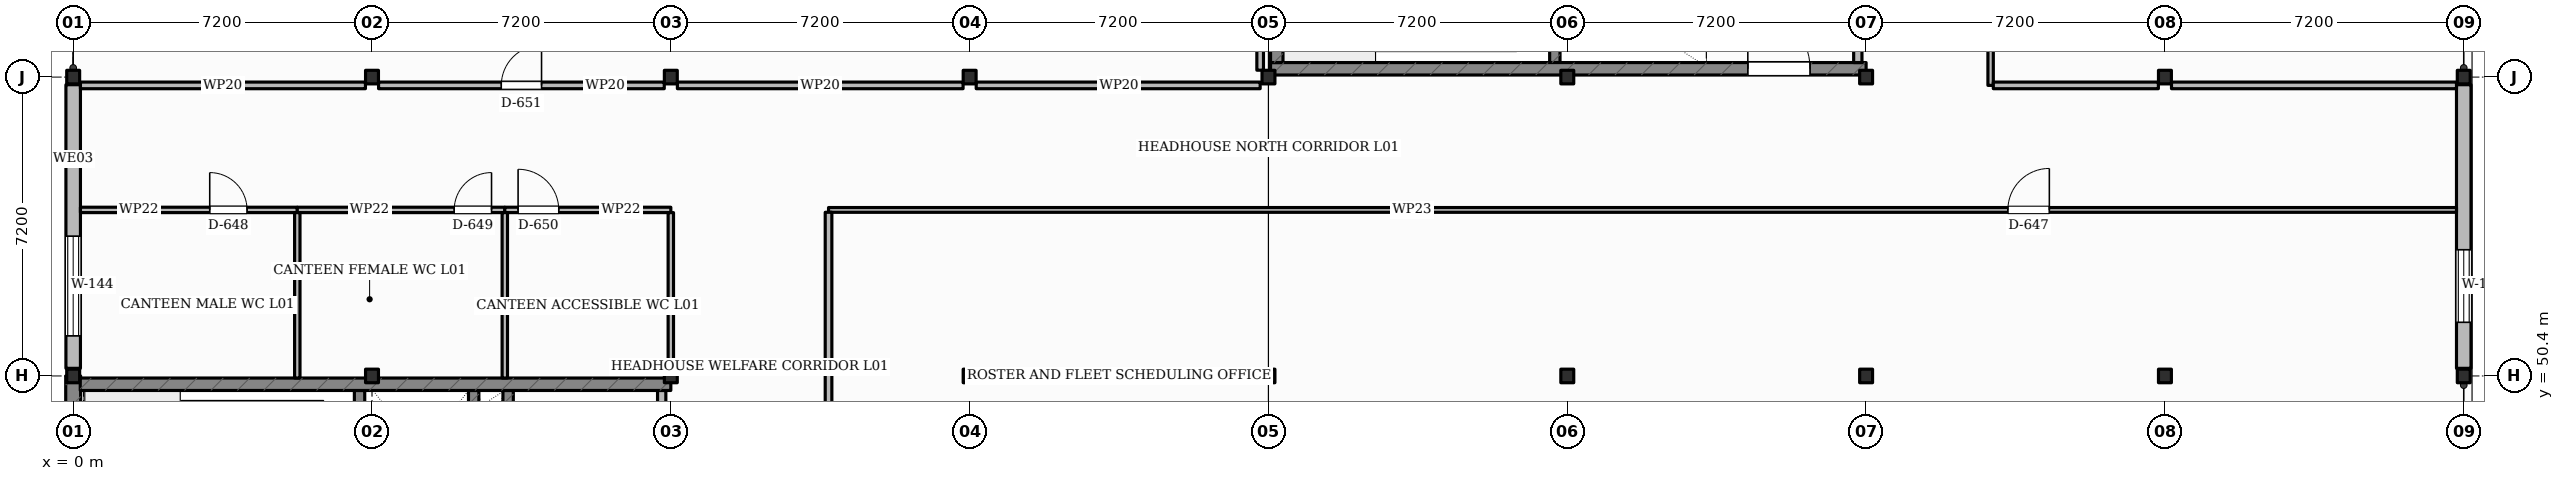
"""IFC4 building model, lengths in metres.
Left out: names, types, materials, properties, quantities, classifications, styles, units other than length and angle.
Written with IfcOpenShell. Run it as: python <this file> out.ifc"""

import sys

from ifc_helpers import new_model, si_unit, direction, frame, frame_2d, origin, origin_2d, place, context, subcontext, project, spatial, rectangle, i_section, extrude, element, fill, save


model = new_model("IFC4")
c1 = context("Model", 3, precision=1e-05, world=origin(), true_north=direction((0.0, 1.0)))
c2 = subcontext(c1, "Body", "Model", "MODEL_VIEW")
j1 = project(units=[si_unit("LENGTHUNIT", "METRE"), si_unit("PLANEANGLEUNIT", "RADIAN")], contexts=[c1])
p1 = place(None, origin())
s1 = spatial("IfcSite", under=j1, at=p1, CompositionType="ELEMENT")
p2 = place(p1, origin())
s2 = spatial("IfcBuilding", under=s1, at=p2, CompositionType="ELEMENT")
p3 = place(p2, frame((0.0, 0.0, 5.4)))
s3 = spatial("IfcBuildingStorey", under=s2, at=p3, CompositionType="ELEMENT", Elevation=5.4)
for number, where, z_axis, x_axis in (
    (1, (0.0, 50.4, 0.0), (0.0, 0.0, 1.0), (1.0, 0.0, 0.0)),
    (2, (0.0, 57.6, 0.0), (0.0, 0.0, 1.0), (1.0, 0.0, 0.0)),
    (3, (7.2, 50.4, 0.0), (0.0, 0.0, 1.0), (1.0, 0.0, 0.0)),
    (4, (7.2, 57.6, 0.0), (0.0, 0.0, 1.0), (1.0, 0.0, 0.0)),
    (5, (14.4, 50.4, 0.0), (0.0, 0.0, 1.0), (1.0, 0.0, 0.0)),
    (6, (14.4, 57.6, 0.0), (0.0, 0.0, 1.0), (1.0, 0.0, 0.0)),
    (7, (21.6, 50.4, 0.0), (0.0, 0.0, 1.0), (1.0, 0.0, 0.0)),
    (8, (21.6, 57.6, 0.0), (0.0, 0.0, 1.0), (1.0, 0.0, 0.0)),
    (9, (28.8, 50.4, 0.0), (0.0, 0.0, 1.0), (1.0, 0.0, 0.0)),
    (10, (28.8, 57.6, 0.0), (0.0, 0.0, 1.0), (1.0, 0.0, 0.0)),
    (11, (36.0, 50.4, 0.0), (0.0, 0.0, 1.0), (1.0, 0.0, 0.0)),
    (12, (36.0, 57.6, 0.0), (0.0, 0.0, 1.0), (1.0, 0.0, 0.0)),
    (13, (43.2, 50.4, 0.0), (0.0, 0.0, 1.0), (1.0, 0.0, 0.0)),
    (14, (43.2, 57.6, 0.0), (0.0, 0.0, 1.0), (1.0, 0.0, 0.0)),
    (15, (50.4, 50.4, 0.0), (0.0, 0.0, 1.0), (1.0, 0.0, 0.0)),
    (16, (50.4, 57.6, 0.0), (0.0, 0.0, 1.0), (1.0, 0.0, 0.0)),
    (17, (57.6, 50.4, 0.0), (0.0, 0.0, 1.0), (1.0, 0.0, 0.0)),
    (18, (57.6, 57.6, 0.0), (0.0, 0.0, 1.0), (1.0, 0.0, 0.0)),
):
    element("IfcColumn", number, at=place(p3, frame(where, z_axis=z_axis, x_axis=x_axis)), inside=s3, PredefinedType="COLUMN", context=c2, shape_type="SweptSolid", body=[
        extrude(i_section(OverallWidth=0.311, OverallDepth=0.327, WebThickness=0.016, FlangeThickness=0.025, FilletRadius=0.015, at=origin_2d()), origin(), (0.0, 0.0, 1.0), 4.5),
    ])
p4 = place(p3, frame((0.0, 43.2, 0.0), z_axis=(0.0, 0.0, 1.0), x_axis=(0.0, 1.0, 0.0)))
e19 = element("IfcWall", 19, at=p4, inside=s3, PredefinedType="SHEAR", context=c2, shape_type="SweptSolid", body=[
    extrude(rectangle(XDim=7.2, YDim=0.36, at=frame_2d((3.6, 0.0))), origin(), (0.0, 0.0, 1.0), 3.704),
])
p5 = place(p3, frame((0.0, 50.583, 0.0), z_axis=(0.0, 0.0, 1.0), x_axis=(0.0, 1.0, 0.0)))
e20 = element("IfcWall", 20, at=p5, inside=s3, PredefinedType="SOLIDWALL", context=c2, shape_type="SweptSolid", body=[
    extrude(rectangle(XDim=6.833, YDim=0.35, at=frame_2d((3.417, 0.0))), origin(), (0.0, 0.0, 1.0), 3.704),
])
p6 = place(p5, frame((0.783, 0.0, 1.05)))
e21 = element("IfcOpeningElement", 21, at=p6, cuts=e20, PredefinedType="OPENING", context=c2, shape_type="SweptSolid", body=[
    extrude(rectangle(XDim=2.4, YDim=1.8, at=frame_2d((1.2, 0.9))), frame((0.0, 0.185, 0.0), z_axis=(0.0, -1.0, 0.0), x_axis=(1.0, 0.0, 0.0)), (0.0, 0.0, 1.0), 0.37),
])
p7 = place(p3, frame((57.6, 57.417, 0.0), z_axis=(0.0, 0.0, 1.0), x_axis=(0.0, -1.0, 0.0)))
e22 = element("IfcWall", 22, at=p7, inside=s3, PredefinedType="SOLIDWALL", context=c2, shape_type="SweptSolid", body=[
    extrude(rectangle(XDim=6.833, YDim=0.35, at=frame_2d((3.417, 0.0))), origin(), (0.0, 0.0, 1.0), 3.478),
])
p8 = place(p7, frame((3.975, 0.0, 1.05)))
e23 = element("IfcOpeningElement", 23, at=p8, cuts=e22, PredefinedType="OPENING", context=c2, shape_type="SweptSolid", body=[
    extrude(rectangle(XDim=1.75, YDim=1.85, at=frame_2d((0.875, 0.925))), frame((0.0, 0.185, 0.0), z_axis=(0.0, -1.0, 0.0), x_axis=(1.0, 0.0, 0.0)), (0.0, 0.0, 1.0), 0.37),
])
p9 = place(p3, frame((6.9, 43.55, 0.0), z_axis=(0.0, 0.0, 1.0), x_axis=(0.0, 1.0, 0.0)))
e24 = element("IfcWall", 24, at=p9, inside=s3, PredefinedType="SHEAR", context=c2, shape_type="SweptSolid", body=[
    extrude(rectangle(XDim=6.5, YDim=0.25, at=frame_2d((3.25, 0.0))), origin(), (0.0, 0.0, 1.0), 3.55),
])
p10 = place(p9, frame((0.95, 0.0, 0.0)))
e25 = element("IfcOpeningElement", 25, at=p10, cuts=e24, PredefinedType="OPENING", context=c2, shape_type="SweptSolid", body=[
    extrude(rectangle(XDim=1.35, YDim=2.15, at=frame_2d((0.675, 1.075))), frame((0.0, 0.135, 0.0), z_axis=(0.0, -1.0, 0.0), x_axis=(1.0, 0.0, 0.0)), (0.0, 0.0, 1.0), 0.27),
])
p11 = place(p3, frame((9.65, 47.085, 0.0), z_axis=(0.0, 0.0, 1.0), x_axis=(0.0, 1.0, 0.0)))
e26 = element("IfcWall", 26, at=p11, inside=s3, PredefinedType="SHEAR", context=c2, shape_type="SweptSolid", body=[
    extrude(rectangle(XDim=2.965, YDim=0.25, at=frame_2d((1.482, 0.0))), origin(), (0.0, 0.0, 1.0), 3.55),
])
p12 = place(p3, frame((10.48, 47.085, 0.0), z_axis=(0.0, 0.0, 1.0), x_axis=(0.0, 1.0, 0.0)))
e27 = element("IfcWall", 27, at=p12, inside=s3, PredefinedType="SHEAR", context=c2, shape_type="SweptSolid", body=[
    extrude(rectangle(XDim=2.965, YDim=0.25, at=frame_2d((1.482, 0.0))), origin(), (0.0, 0.0, 1.0), 3.55),
])
p13 = place(p12, frame((0.9, 0.0, 0.0)))
e28 = element("IfcOpeningElement", 28, at=p13, cuts=e27, PredefinedType="OPENING", context=c2, shape_type="SweptSolid", body=[
    extrude(rectangle(XDim=0.92, YDim=2.05, at=frame_2d((0.46, 1.025))), frame((0.0, 0.135, 0.0), z_axis=(0.0, -1.0, 0.0), x_axis=(1.0, 0.0, 0.0)), (0.0, 0.0, 1.0), 0.27),
])
p14 = place(p3, frame((14.18, 43.55, 0.0), z_axis=(0.0, 0.0, 1.0), x_axis=(0.0, 1.0, 0.0)))
e29 = element("IfcWall", 29, at=p14, inside=s3, PredefinedType="SOLIDWALL", context=c2, shape_type="SweptSolid", body=[
    extrude(rectangle(XDim=6.5, YDim=0.2, at=frame_2d((3.25, 0.0))), origin(), (0.0, 0.0, 1.0), 3.55),
])
p15 = place(p14, frame((2.5, 0.0, 0.0)))
e30 = element("IfcOpeningElement", 30, at=p15, cuts=e29, PredefinedType="OPENING", context=c2, shape_type="SweptSolid", body=[
    extrude(rectangle(XDim=1.5, YDim=2.15, at=frame_2d((0.75, 1.075))), frame((0.0, 0.11, 0.0), z_axis=(0.0, -1.0, 0.0), x_axis=(1.0, 0.0, 0.0)), (0.0, 0.0, 1.0), 0.22),
])
p16 = place(p3, frame((0.17, 50.2, 0.0), z_axis=(0.0, 0.0, 1.0), x_axis=(1.0, 0.0, 0.0)))
e31 = element("IfcWall", 31, at=p16, inside=s3, PredefinedType="SHEAR", context=c2, shape_type="SweptSolid", body=[
    extrude(rectangle(XDim=14.23, YDim=0.3, at=frame_2d((7.115, 0.0))), origin(), (0.0, 0.0, 1.0), 3.55),
])
p17 = place(p3, frame((35.7, 57.95, 0.0), z_axis=(0.0, 0.0, 1.0), x_axis=(0.0, 1.0, 0.0)))
e32 = element("IfcWall", 32, at=p17, inside=s3, PredefinedType="SHEAR", context=c2, shape_type="SweptSolid", body=[
    extrude(rectangle(XDim=6.5, YDim=0.25, at=frame_2d((3.25, 0.0))), origin(), (0.0, 0.0, 1.0), 3.55),
])
p18 = place(p17, frame((0.95, 0.0, 0.0)))
e33 = element("IfcOpeningElement", 33, at=p18, cuts=e32, PredefinedType="OPENING", context=c2, shape_type="SweptSolid", body=[
    extrude(rectangle(XDim=1.35, YDim=2.15, at=frame_2d((0.675, 1.075))), frame((0.0, 0.135, 0.0), z_axis=(0.0, -1.0, 0.0), x_axis=(1.0, 0.0, 0.0)), (0.0, 0.0, 1.0), 0.27),
])
p19 = place(p3, frame((28.85, 57.8, 0.0), z_axis=(0.0, 0.0, 1.0), x_axis=(1.0, 0.0, 0.0)))
e34 = element("IfcWall", 34, at=p19, inside=s3, PredefinedType="SHEAR", context=c2, shape_type="SweptSolid", body=[
    extrude(rectangle(XDim=14.35, YDim=0.3, at=frame_2d((7.175, 0.0))), origin(), (0.0, 0.0, 1.0), 3.55),
])
p20 = place(p19, frame((11.5, 0.0, 0.0)))
e35 = element("IfcOpeningElement", 35, at=p20, cuts=e34, PredefinedType="OPENING", context=c2, shape_type="SweptSolid", body=[
    extrude(rectangle(XDim=1.5, YDim=2.15, at=frame_2d((0.75, 1.075))), frame((0.0, 0.16, 0.0), z_axis=(0.0, -1.0, 0.0), x_axis=(1.0, 0.0, 0.0)), (0.0, 0.0, 1.0), 0.32),
])
p21 = place(p3, frame((29.0, 57.95, 0.0), z_axis=(0.0, 0.0, 1.0), x_axis=(0.0, 1.0, 0.0)))
e36 = element("IfcWall", 36, at=p21, inside=s3, PredefinedType="SHEAR", context=c2, shape_type="SweptSolid", body=[
    extrude(rectangle(XDim=6.5, YDim=0.3, at=frame_2d((3.25, 0.0))), origin(), (0.0, 0.0, 1.0), 3.55),
])
p22 = place(p3, frame((43.0, 57.95, 0.0), z_axis=(0.0, 0.0, 1.0), x_axis=(0.0, 1.0, 0.0)))
e37 = element("IfcWall", 37, at=p22, inside=s3, PredefinedType="SOLIDWALL", context=c2, shape_type="SweptSolid", body=[
    extrude(rectangle(XDim=6.5, YDim=0.2, at=frame_2d((3.25, 0.0))), origin(), (0.0, 0.0, 1.0), 3.55),
])
p23 = place(p3, frame((18.2, 54.4, 0.0), z_axis=(0.0, 0.0, 1.0), x_axis=(1.0, 0.0, 0.0)))
e38 = element("IfcWall", 38, at=p23, inside=s3, PredefinedType="PARTITIONING", context=c2, shape_type="SweptSolid", body=[
    extrude(rectangle(XDim=39.225, YDim=0.115, at=frame_2d((19.613, 0.0))), origin(), (0.0, 0.0, 1.0), 3.55),
])
p24 = place(p23, frame((28.415, 0.0, 0.0)))
e39 = element("IfcOpeningElement", 39, at=p24, cuts=e38, PredefinedType="OPENING", context=c2, shape_type="SweptSolid", body=[
    extrude(rectangle(XDim=1.0, YDim=2.1, at=frame_2d((0.5, 1.05))), frame((0.0, 0.067, 0.0), z_axis=(0.0, -1.0, 0.0), x_axis=(1.0, 0.0, 0.0)), (0.0, 0.0, 1.0), 0.135),
])
p25 = place(p3, frame((0.175, 54.4, 0.0), z_axis=(0.0, 0.0, 1.0), x_axis=(1.0, 0.0, 0.0)))
e40 = element("IfcWall", 40, at=p25, inside=s3, PredefinedType="PARTITIONING", context=c2, shape_type="SweptSolid", body=[
    extrude(rectangle(XDim=5.225, YDim=0.13, at=frame_2d((2.612, 0.0))), origin(), (0.0, 0.0, 1.0), 3.55),
])
p26 = place(p25, frame((3.115, 0.0, 0.0)))
e41 = element("IfcOpeningElement", 41, at=p26, cuts=e40, PredefinedType="OPENING", context=c2, shape_type="SweptSolid", body=[
    extrude(rectangle(XDim=0.9, YDim=2.05, at=frame_2d((0.45, 1.025))), frame((0.0, 0.075, 0.0), z_axis=(0.0, -1.0, 0.0), x_axis=(1.0, 0.0, 0.0)), (0.0, 0.0, 1.0), 0.15),
])
p27 = place(p3, frame((5.4, 54.4, 0.0), z_axis=(0.0, 0.0, 1.0), x_axis=(1.0, 0.0, 0.0)))
e42 = element("IfcWall", 42, at=p27, inside=s3, PredefinedType="PARTITIONING", context=c2, shape_type="SweptSolid", body=[
    extrude(rectangle(XDim=5.0, YDim=0.13, at=frame_2d((2.5, 0.0))), origin(), (0.0, 0.0, 1.0), 3.55),
])
p28 = place(p27, frame((3.78, 0.0, 0.0)))
e43 = element("IfcOpeningElement", 43, at=p28, cuts=e42, PredefinedType="OPENING", context=c2, shape_type="SweptSolid", body=[
    extrude(rectangle(XDim=0.9, YDim=2.05, at=frame_2d((0.45, 1.025))), frame((0.0, 0.075, 0.0), z_axis=(0.0, -1.0, 0.0), x_axis=(1.0, 0.0, 0.0)), (0.0, 0.0, 1.0), 0.15),
])
p29 = place(p3, frame((10.4, 54.4, 0.0), z_axis=(0.0, 0.0, 1.0), x_axis=(1.0, 0.0, 0.0)))
e44 = element("IfcWall", 44, at=p29, inside=s3, PredefinedType="PARTITIONING", context=c2, shape_type="SweptSolid", body=[
    extrude(rectangle(XDim=4.0, YDim=0.13, at=frame_2d((2.0, 0.0))), origin(), (0.0, 0.0, 1.0), 3.55),
])
p30 = place(p29, frame((0.32, 0.0, 0.0)))
e45 = element("IfcOpeningElement", 45, at=p30, cuts=e44, PredefinedType="OPENING", context=c2, shape_type="SweptSolid", body=[
    extrude(rectangle(XDim=0.98, YDim=2.1, at=frame_2d((0.49, 1.05))), frame((0.0, 0.075, 0.0), z_axis=(0.0, -1.0, 0.0), x_axis=(1.0, 0.0, 0.0)), (0.0, 0.0, 1.0), 0.15),
])
p31 = place(p3, frame((0.175, 57.4, 0.0), z_axis=(0.0, 0.0, 1.0), x_axis=(1.0, 0.0, 0.0)))
e46 = element("IfcWall", 46, at=p31, inside=s3, PredefinedType="PARTITIONING", context=c2, shape_type="SweptSolid", body=[
    extrude(rectangle(XDim=6.867, YDim=0.16, at=frame_2d((3.434, 0.0))), origin(), (0.0, 0.0, 1.0), 3.55),
])
p32 = place(p3, frame((7.358, 57.4, 0.0), z_axis=(0.0, 0.0, 1.0), x_axis=(1.0, 0.0, 0.0)))
e47 = element("IfcWall", 47, at=p32, inside=s3, PredefinedType="PARTITIONING", context=c2, shape_type="SweptSolid", body=[
    extrude(rectangle(XDim=6.884, YDim=0.16, at=frame_2d((3.442, 0.0))), origin(), (0.0, 0.0, 1.0), 3.55),
])
p33 = place(p32, frame((2.957, 0.0, 0.0)))
e48 = element("IfcOpeningElement", 48, at=p33, cuts=e47, PredefinedType="OPENING", context=c2, shape_type="SweptSolid", body=[
    extrude(rectangle(XDim=0.97, YDim=2.12, at=frame_2d((0.485, 1.06))), frame((0.0, 0.09, 0.0), z_axis=(0.0, -1.0, 0.0), x_axis=(1.0, 0.0, 0.0)), (0.0, 0.0, 1.0), 0.18),
])
p34 = place(p3, frame((14.558, 57.4, 0.0), z_axis=(0.0, 0.0, 1.0), x_axis=(1.0, 0.0, 0.0)))
e49 = element("IfcWall", 49, at=p34, inside=s3, PredefinedType="PARTITIONING", context=c2, shape_type="SweptSolid", body=[
    extrude(rectangle(XDim=6.884, YDim=0.16, at=frame_2d((3.442, 0.0))), origin(), (0.0, 0.0, 1.0), 3.55),
])
p35 = place(p3, frame((21.758, 57.4, 0.0), z_axis=(0.0, 0.0, 1.0), x_axis=(1.0, 0.0, 0.0)))
e50 = element("IfcWall", 50, at=p35, inside=s3, PredefinedType="PARTITIONING", context=c2, shape_type="SweptSolid", body=[
    extrude(rectangle(XDim=6.842, YDim=0.16, at=frame_2d((3.421, 0.0))), origin(), (0.0, 0.0, 1.0), 3.55),
])
p36 = place(p3, frame((46.2, 57.4, 0.0), z_axis=(0.0, 0.0, 1.0), x_axis=(0.0, 1.0, 0.0)))
e51 = element("IfcWall", 51, at=p36, inside=s3, PredefinedType="PARTITIONING", context=c2, shape_type="SweptSolid", body=[
    extrude(rectangle(XDim=21.7, YDim=0.13, at=frame_2d((10.85, 0.0))), origin(), (0.0, 0.0, 1.0), 3.435),
])
p37 = place(p36, frame((17.628, 0.0, 0.0)))
e52 = element("IfcOpeningElement", 52, at=p37, cuts=e51, PredefinedType="OPENING", context=c2, shape_type="SweptSolid", body=[
    extrude(rectangle(XDim=1.08, YDim=2.15, at=frame_2d((0.54, 1.075))), frame((0.0, 0.075, 0.0), z_axis=(0.0, -1.0, 0.0), x_axis=(1.0, 0.0, 0.0)), (0.0, 0.0, 1.0), 0.15),
])
p38 = place(p3, frame((18.2, 43.08, 0.0), z_axis=(0.0, 0.0, 1.0), x_axis=(0.0, 1.0, 0.0)))
e53 = element("IfcWall", 53, at=p38, inside=s3, PredefinedType="PARTITIONING", context=c2, shape_type="SweptSolid", body=[
    extrude(rectangle(XDim=11.263, YDim=0.16, at=frame_2d((5.631, 0.0))), origin(), (0.0, 0.0, 1.0), 3.55),
])
for number, where, z_axis, x_axis in (
    (54, (5.4, 50.35, 0.0), (0.0, 0.0, 1.0), (0.0, 1.0, 0.0)),
    (55, (10.4, 50.35, 0.0), (0.0, 0.0, 1.0), (0.0, 1.0, 0.0)),
):
    element("IfcWall", number, at=place(p3, frame(where, z_axis=z_axis, x_axis=x_axis)), inside=s3, PredefinedType="PARTITIONING", context=c2, shape_type="SweptSolid", body=[
        extrude(rectangle(XDim=3.985, YDim=0.13, at=frame_2d((1.992, 0.0))), origin(), (0.0, 0.0, 1.0), 3.55),
    ])
p39 = place(p3, frame((14.4, 50.566, 0.0), z_axis=(0.0, 0.0, 1.0), x_axis=(0.0, 1.0, 0.0)))
e56 = element("IfcWall", 56, at=p39, inside=s3, PredefinedType="PARTITIONING", context=c2, shape_type="SweptSolid", body=[
    extrude(rectangle(XDim=3.769, YDim=0.13, at=frame_2d((1.885, 0.0))), origin(), (0.0, 0.0, 1.0), 3.55),
])
p40 = place(p3, frame((28.6, 57.766, 0.0), z_axis=(0.0, 0.0, 1.0), x_axis=(0.0, 1.0, 0.0)))
e57 = element("IfcWall", 57, at=p40, inside=s3, PredefinedType="PARTITIONING", context=c2, shape_type="SweptSolid", body=[
    extrude(rectangle(XDim=6.868, YDim=0.16, at=frame_2d((3.434, 0.0))), origin(), (0.0, 0.0, 1.0), 3.55),
])
p41 = place(p3, frame((46.265, 57.4, 0.0), z_axis=(0.0, 0.0, 1.0), x_axis=(1.0, 0.0, 0.0)))
e58 = element("IfcWall", 58, at=p41, inside=s3, PredefinedType="PARTITIONING", context=c2, shape_type="SweptSolid", body=[
    extrude(rectangle(XDim=3.977, YDim=0.16, at=frame_2d((1.989, 0.0))), origin(), (0.0, 0.0, 1.0), 3.55),
])
p42 = place(p3, frame((50.558, 57.4, 0.0), z_axis=(0.0, 0.0, 1.0), x_axis=(1.0, 0.0, 0.0)))
e59 = element("IfcWall", 59, at=p42, inside=s3, PredefinedType="PARTITIONING", context=c2, shape_type="SweptSolid", body=[
    extrude(rectangle(XDim=6.867, YDim=0.16, at=frame_2d((3.434, 0.0))), origin(), (0.0, 0.0, 1.0), 3.55),
])
p43 = place(p6, origin())
e60 = element("IfcWindow", 60, at=p43, inside=s3, PartitioningType="SINGLE_PANEL", PredefinedType="WINDOW", context=c2, shape_type="SweptSolid", body=[
    extrude(rectangle(XDim=2.4, YDim=1.8, at=frame_2d((1.2, 0.9))), frame((0.0, 0.03, 0.0), z_axis=(0.0, -1.0, 0.0), x_axis=(1.0, 0.0, 0.0)), (0.0, 0.0, 1.0), 0.06),
])
fill(e21, e60)
p44 = place(p8, origin())
e61 = element("IfcWindow", 61, at=p44, inside=s3, PartitioningType="SINGLE_PANEL", PredefinedType="WINDOW", context=c2, shape_type="SweptSolid", body=[
    extrude(rectangle(XDim=1.75, YDim=1.85, at=frame_2d((0.875, 0.925))), frame((0.0, 0.03, 0.0), z_axis=(0.0, -1.0, 0.0), x_axis=(1.0, 0.0, 0.0)), (0.0, 0.0, 1.0), 0.06),
])
fill(e23, e61)
p45 = place(p20, origin())
e62 = element("IfcDoor", 62, at=p45, inside=s3, OperationType="SINGLE_SWING_LEFT", PredefinedType="DOOR", context=c2, shape_type="SweptSolid", body=[
    extrude(rectangle(XDim=1.5, YDim=2.15, at=frame_2d((0.75, 1.075))), frame((0.0, 0.025, 0.0), z_axis=(0.0, -1.0, 0.0), x_axis=(1.0, 0.0, 0.0)), (0.0, 0.0, 1.0), 0.05),
])
fill(e35, e62)
p46 = place(p24, origin())
e63 = element("IfcDoor", 63, at=p46, inside=s3, OperationType="SINGLE_SWING_RIGHT", PredefinedType="DOOR", context=c2, shape_type="SweptSolid", body=[
    extrude(rectangle(XDim=1.0, YDim=2.1, at=frame_2d((0.5, 1.05))), frame((0.0, 0.025, 0.0), z_axis=(0.0, -1.0, 0.0), x_axis=(1.0, 0.0, 0.0)), (0.0, 0.0, 1.0), 0.05),
])
fill(e39, e63)
p47 = place(p26, origin())
e64 = element("IfcDoor", 64, at=p47, inside=s3, OperationType="SINGLE_SWING_LEFT", PredefinedType="DOOR", context=c2, shape_type="SweptSolid", body=[
    extrude(rectangle(XDim=0.9, YDim=2.05, at=frame_2d((0.45, 1.025))), frame((0.0, 0.025, 0.0), z_axis=(0.0, -1.0, 0.0), x_axis=(1.0, 0.0, 0.0)), (0.0, 0.0, 1.0), 0.05),
])
fill(e41, e64)
p48 = place(p28, origin())
e65 = element("IfcDoor", 65, at=p48, inside=s3, OperationType="SINGLE_SWING_RIGHT", PredefinedType="DOOR", context=c2, shape_type="SweptSolid", body=[
    extrude(rectangle(XDim=0.9, YDim=2.05, at=frame_2d((0.45, 1.025))), frame((0.0, 0.025, 0.0), z_axis=(0.0, -1.0, 0.0), x_axis=(1.0, 0.0, 0.0)), (0.0, 0.0, 1.0), 0.05),
])
fill(e43, e65)
p49 = place(p30, origin())
e66 = element("IfcDoor", 66, at=p49, inside=s3, OperationType="SINGLE_SWING_LEFT", PredefinedType="DOOR", context=c2, shape_type="SweptSolid", body=[
    extrude(rectangle(XDim=0.98, YDim=2.1, at=frame_2d((0.49, 1.05))), frame((0.0, 0.025, 0.0), z_axis=(0.0, -1.0, 0.0), x_axis=(1.0, 0.0, 0.0)), (0.0, 0.0, 1.0), 0.05),
])
fill(e45, e66)
p50 = place(p33, origin())
e67 = element("IfcDoor", 67, at=p50, inside=s3, OperationType="SINGLE_SWING_RIGHT", PredefinedType="DOOR", context=c2, shape_type="SweptSolid", body=[
    extrude(rectangle(XDim=0.97, YDim=2.12, at=frame_2d((0.485, 1.06))), frame((0.0, 0.025, 0.0), z_axis=(0.0, -1.0, 0.0), x_axis=(1.0, 0.0, 0.0)), (0.0, 0.0, 1.0), 0.05),
])
fill(e48, e67)
save(model, sys.argv[1])
